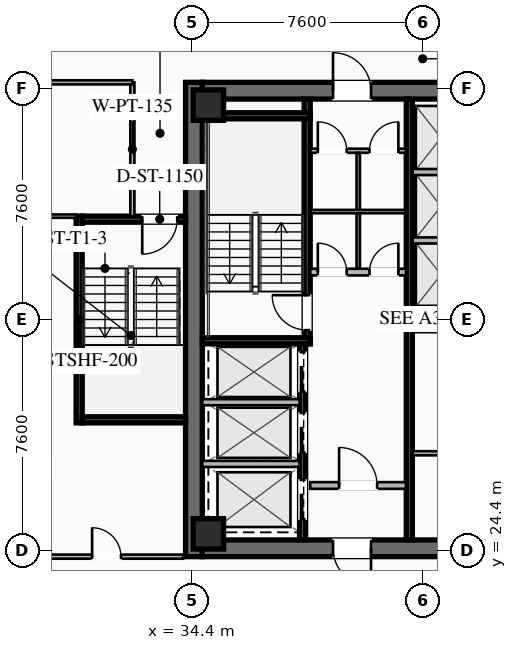
"""IFC4 building model, lengths in metres.
Left out: names, types, materials, properties, quantities, classifications, styles, units other than length and angle.
Written with IfcOpenShell. Run it as: python <this file> out.ifc"""

import sys

from ifc_helpers import new_model, si_unit, direction, frame, frame_2d, origin, origin_2d, place, context, subcontext, project, spatial, rectangle, hollow_rectangle, extrude, element, fill, save


model = new_model("IFC4")
c1 = context("Model", 3, precision=1e-05, world=origin(), true_north=direction((0.0, 1.0)))
c2 = subcontext(c1, "Body", "Model", "MODEL_VIEW")
j1 = project(units=[si_unit("LENGTHUNIT", "METRE"), si_unit("PLANEANGLEUNIT", "RADIAN")], contexts=[c1])
p1 = place(None, origin())
s1 = spatial("IfcSite", under=j1, at=p1, CompositionType="ELEMENT")
p2 = place(p1, origin())
s2 = spatial("IfcBuilding", under=s1, at=p2, CompositionType="ELEMENT")
p3 = place(p2, frame((0.0, 0.0, 188.95)))
s3 = spatial("IfcBuildingStorey", under=s2, at=p3, CompositionType="ELEMENT", Elevation=188.95)
p4 = place(p3, frame((34.475, 24.2, 0.0), z_axis=(0.0, 0.0, 1.0), x_axis=(0.0, 1.0, 0.0)))
e1 = element("IfcWall", 1, at=p4, inside=s3, PredefinedType="SHEAR", context=c2, shape_type="SweptSolid", body=[
    extrude(rectangle(XDim=15.6, YDim=0.55, at=frame_2d((7.8, 0.0))), origin(), (0.0, 0.0, 1.0), 3.55),
])
p5 = place(p3, frame((49.25, 24.475, 0.0), z_axis=(0.0, 0.0, 1.0), x_axis=(-1.0, 0.0, 0.0)))
e2 = element("IfcWall", 2, at=p5, inside=s3, PredefinedType="SHEAR", context=c2, shape_type="SweptSolid", body=[
    extrude(rectangle(XDim=14.5, YDim=0.55, at=frame_2d((7.25, 0.0))), origin(), (0.0, 0.0, 1.0), 3.55),
])
p6 = place(p5, frame((8.95, 0.0, 0.0)))
e3 = element("IfcOpeningElement", 3, at=p6, cuts=e2, PredefinedType="OPENING", context=c2, shape_type="SweptSolid", body=[
    extrude(rectangle(XDim=1.25, YDim=2.25, at=frame_2d((0.625, 1.125))), frame((0.0, 0.285, 0.0), z_axis=(0.0, -1.0, 0.0), x_axis=(1.0, 0.0, 0.0)), (0.0, 0.0, 1.0), 0.57),
])
p7 = place(p5, frame((3.9, 0.0, 0.0)))
e4 = element("IfcOpeningElement", 4, at=p7, cuts=e2, PredefinedType="OPENING", context=c2, shape_type="SweptSolid", body=[
    extrude(rectangle(XDim=1.25, YDim=2.25, at=frame_2d((0.625, 1.125))), frame((0.0, 0.285, 0.0), z_axis=(0.0, -1.0, 0.0), x_axis=(1.0, 0.0, 0.0)), (0.0, 0.0, 1.0), 0.57),
])
p8 = place(p3, frame((34.75, 39.525, 0.0), z_axis=(0.0, 0.0, 1.0), x_axis=(1.0, 0.0, 0.0)))
e5 = element("IfcWall", 5, at=p8, inside=s3, PredefinedType="SHEAR", context=c2, shape_type="SweptSolid", body=[
    extrude(rectangle(XDim=14.5, YDim=0.55, at=frame_2d((7.25, 0.0))), origin(), (0.0, 0.0, 1.0), 3.55),
])
p9 = place(p8, frame((4.3, 0.0, 0.0)))
e6 = element("IfcOpeningElement", 6, at=p9, cuts=e5, PredefinedType="OPENING", context=c2, shape_type="SweptSolid", body=[
    extrude(rectangle(XDim=1.25, YDim=2.25, at=frame_2d((0.625, 1.125))), frame((0.0, 0.285, 0.0), z_axis=(0.0, -1.0, 0.0), x_axis=(1.0, 0.0, 0.0)), (0.0, 0.0, 1.0), 0.57),
])
p10 = place(p8, frame((9.35, 0.0, 0.0)))
e7 = element("IfcOpeningElement", 7, at=p10, cuts=e5, PredefinedType="OPENING", context=c2, shape_type="SweptSolid", body=[
    extrude(rectangle(XDim=1.25, YDim=2.25, at=frame_2d((0.625, 1.125))), frame((0.0, 0.285, 0.0), z_axis=(0.0, -1.0, 0.0), x_axis=(1.0, 0.0, 0.0)), (0.0, 0.0, 1.0), 0.57),
])
for number, where, z_axis, x_axis in (
    (8, (34.95, 24.95, 0.0), (0.0, 0.0, 1.0), (1.0, 0.0, 0.0)),
    (9, (34.95, 39.05, 0.0), (0.0, 0.0, 1.0), (1.0, 0.0, 0.0)),
):
    element("IfcColumn", number, at=place(p3, frame(where, z_axis=z_axis, x_axis=x_axis)), inside=s3, PredefinedType="COLUMN", context=c2, shape_type="SweptSolid", body=[
        extrude(hollow_rectangle(XDim=1.0, YDim=1.0, WallThickness=0.04, at=origin_2d()), origin(), (0.0, 0.0, 1.0), 3.37),
    ])
p11 = place(p3, frame((38.2, 31.2, 0.0), z_axis=(0.0, 0.0, 1.0), x_axis=(0.0, 1.0, 0.0)))
e10 = element("IfcWall", 10, at=p11, inside=s3, PredefinedType="SHEAR", context=c2, shape_type="SweptSolid", body=[
    extrude(rectangle(XDim=8.05, YDim=0.2, at=frame_2d((4.025, 0.0))), origin(), (0.0, 0.0, 1.0), 3.37),
])
p12 = place(p11, frame((0.45, 0.0, 0.0)))
e11 = element("IfcOpeningElement", 11, at=p12, cuts=e10, PredefinedType="OPENING", context=c2, shape_type="SweptSolid", body=[
    extrude(rectangle(XDim=1.15, YDim=2.2, at=frame_2d((0.575, 1.1))), frame((0.0, 0.11, 0.0), z_axis=(0.0, -1.0, 0.0), x_axis=(1.0, 0.0, 0.0)), (0.0, 0.0, 1.0), 0.22),
])
for number, where, z_axis, x_axis in (
    (12, (34.75, 31.3, 0.0), (0.0, 0.0, 1.0), (1.0, 0.0, 0.0)),
    (13, (34.75, 38.7, 0.0), (0.0, 0.0, 1.0), (1.0, 0.0, 0.0)),
):
    element("IfcWall", number, at=place(p3, frame(where, z_axis=z_axis, x_axis=x_axis)), inside=s3, PredefinedType="SHEAR", context=c2, shape_type="SweptSolid", body=[
        extrude(rectangle(XDim=3.55, YDim=0.2, at=frame_2d((1.775, 0.0))), origin(), (0.0, 0.0, 1.0), 3.37),
    ])
p13 = place(p3, frame((41.56, 24.75, 0.0), z_axis=(0.0, 0.0, 1.0), x_axis=(0.0, 1.0, 0.0)))
e14 = element("IfcWall", 14, at=p13, inside=s3, PredefinedType="SHEAR", context=c2, shape_type="SweptSolid", body=[
    extrude(rectangle(XDim=14.5, YDim=0.2, at=frame_2d((7.25, 0.0))), origin(), (0.0, 0.0, 1.0), 3.37),
])
p14 = place(p3, frame((38.3, 33.56, 0.0), z_axis=(0.0, 0.0, 1.0), x_axis=(1.0, 0.0, 0.0)))
e15 = element("IfcWall", 15, at=p14, inside=s3, PredefinedType="SOLIDWALL", context=c2, shape_type="SweptSolid", body=[
    extrude(rectangle(XDim=3.15, YDim=0.22, at=frame_2d((1.575, 0.0))), origin(), (0.0, 0.0, 1.0), 2.723),
])
p15 = place(p14, frame((0.25, 0.0, 0.0)))
e16 = element("IfcOpeningElement", 16, at=p15, cuts=e15, PredefinedType="OPENING", context=c2, shape_type="SweptSolid", body=[
    extrude(rectangle(XDim=0.95, YDim=2.05, at=frame_2d((0.475, 1.025))), frame((0.0, 0.12, 0.0), z_axis=(0.0, -1.0, 0.0), x_axis=(1.0, 0.0, 0.0)), (0.0, 0.0, 1.0), 0.24),
])
p16 = place(p14, frame((1.95, 0.0, 0.0)))
e17 = element("IfcOpeningElement", 17, at=p16, cuts=e15, PredefinedType="OPENING", context=c2, shape_type="SweptSolid", body=[
    extrude(rectangle(XDim=0.95, YDim=2.05, at=frame_2d((0.475, 1.025))), frame((0.0, 0.12, 0.0), z_axis=(0.0, -1.0, 0.0), x_axis=(1.0, 0.0, 0.0)), (0.0, 0.0, 1.0), 0.24),
])
p17 = place(p3, frame((38.3, 26.54, 0.0), z_axis=(0.0, 0.0, 1.0), x_axis=(1.0, 0.0, 0.0)))
e18 = element("IfcWall", 18, at=p17, inside=s3, PredefinedType="SOLIDWALL", context=c2, shape_type="SweptSolid", body=[
    extrude(rectangle(XDim=3.15, YDim=0.22, at=frame_2d((1.575, 0.0))), origin(), (0.0, 0.0, 1.0), 2.723),
])
p18 = place(p17, frame((0.95, 0.0, 0.0)))
e19 = element("IfcOpeningElement", 19, at=p18, cuts=e18, PredefinedType="OPENING", context=c2, shape_type="SweptSolid", body=[
    extrude(rectangle(XDim=1.25, YDim=2.25, at=frame_2d((0.625, 1.125))), frame((0.0, 0.12, 0.0), z_axis=(0.0, -1.0, 0.0), x_axis=(1.0, 0.0, 0.0)), (0.0, 0.0, 1.0), 0.24),
])
p19 = place(p3, frame((38.05, 24.75, 0.0), z_axis=(0.0, 0.0, 1.0), x_axis=(0.0, 1.0, 0.0)))
e20 = element("IfcWall", 20, at=p19, inside=s3, PredefinedType="SHEAR", context=c2, shape_type="SweptSolid", body=[
    extrude(rectangle(XDim=6.45, YDim=0.2, at=frame_2d((3.225, 0.0))), origin(), (0.0, 0.0, 1.0), 3.37),
])
p20 = place(p19, frame((4.875, 0.0, 0.0)))
e21 = element("IfcOpeningElement", 21, at=p20, cuts=e20, PredefinedType="OPENING", context=c2, shape_type="SweptSolid", body=[
    extrude(rectangle(XDim=1.3, YDim=2.25, at=frame_2d((0.65, 1.125))), frame((0.0, 0.11, 0.0), z_axis=(0.0, -1.0, 0.0), x_axis=(1.0, 0.0, 0.0)), (0.0, 0.0, 1.0), 0.22),
])
p21 = place(p19, frame((2.875, 0.0, 0.0)))
e22 = element("IfcOpeningElement", 22, at=p21, cuts=e20, PredefinedType="OPENING", context=c2, shape_type="SweptSolid", body=[
    extrude(rectangle(XDim=1.3, YDim=2.25, at=frame_2d((0.65, 1.125))), frame((0.0, 0.11, 0.0), z_axis=(0.0, -1.0, 0.0), x_axis=(1.0, 0.0, 0.0)), (0.0, 0.0, 1.0), 0.22),
])
p22 = place(p19, frame((0.675, 0.0, 0.0)))
e23 = element("IfcOpeningElement", 23, at=p22, cuts=e20, PredefinedType="OPENING", context=c2, shape_type="SweptSolid", body=[
    extrude(rectangle(XDim=1.3, YDim=2.25, at=frame_2d((0.65, 1.125))), frame((0.0, 0.11, 0.0), z_axis=(0.0, -1.0, 0.0), x_axis=(1.0, 0.0, 0.0)), (0.0, 0.0, 1.0), 0.22),
])
for number, where, z_axis, x_axis in (
    (24, (34.75, 27.25, 0.0), (0.0, 0.0, 1.0), (1.0, 0.0, 0.0)),
    (25, (34.75, 29.28, 0.0), (0.0, 0.0, 1.0), (1.0, 0.0, 0.0)),
):
    element("IfcWall", number, at=place(p3, frame(where, z_axis=z_axis, x_axis=x_axis)), inside=s3, PredefinedType="SOLIDWALL", context=c2, shape_type="SweptSolid", body=[
        extrude(rectangle(XDim=3.2, YDim=0.2, at=frame_2d((1.6, 0.0))), origin(), (0.0, 0.0, 1.0), 3.37),
    ])
p23 = place(p3, frame((38.3, 37.55, 0.0), z_axis=(0.0, 0.0, 1.0), x_axis=(1.0, 0.0, 0.0)))
e26 = element("IfcWall", 26, at=p23, inside=s3, PredefinedType="PARTITIONING", context=c2, shape_type="SweptSolid", body=[
    extrude(rectangle(XDim=3.15, YDim=0.135, at=frame_2d((1.575, 0.0))), origin(), (0.0, 0.0, 1.0), 2.723),
])
p24 = place(p23, frame((0.25, 0.0, 0.0)))
e27 = element("IfcOpeningElement", 27, at=p24, cuts=e26, PredefinedType="OPENING", context=c2, shape_type="SweptSolid", body=[
    extrude(rectangle(XDim=0.95, YDim=2.05, at=frame_2d((0.475, 1.025))), frame((0.0, 0.077, 0.0), z_axis=(0.0, -1.0, 0.0), x_axis=(1.0, 0.0, 0.0)), (0.0, 0.0, 1.0), 0.155),
])
p25 = place(p23, frame((1.95, 0.0, 0.0)))
e28 = element("IfcOpeningElement", 28, at=p25, cuts=e26, PredefinedType="OPENING", context=c2, shape_type="SweptSolid", body=[
    extrude(rectangle(XDim=0.95, YDim=2.05, at=frame_2d((0.475, 1.025))), frame((0.0, 0.077, 0.0), z_axis=(0.0, -1.0, 0.0), x_axis=(1.0, 0.0, 0.0)), (0.0, 0.0, 1.0), 0.155),
])
p26 = place(p3, frame((39.88, 33.68, 0.0), z_axis=(0.0, 0.0, 1.0), x_axis=(0.0, 1.0, 0.0)))
e29 = element("IfcWall", 29, at=p26, inside=s3, PredefinedType="PARTITIONING", context=c2, shape_type="SweptSolid", body=[
    extrude(rectangle(XDim=3.8, YDim=0.11, at=frame_2d((1.9, 0.0))), origin(), (0.0, 0.0, 1.0), 2.723),
])
p27 = place(p3, frame((38.3, 35.55, 0.0), z_axis=(0.0, 0.0, 1.0), x_axis=(1.0, 0.0, 0.0)))
e30 = element("IfcWall", 30, at=p27, inside=s3, PredefinedType="PARTITIONING", context=c2, shape_type="SweptSolid", body=[
    extrude(rectangle(XDim=3.15, YDim=0.11, at=frame_2d((1.575, 0.0))), origin(), (0.0, 0.0, 1.0), 2.723),
])
for number, where, z_axis, x_axis in (
    (31, (41.67, 31.65, 0.0), (0.0, 0.0, 1.0), (1.0, 0.0, 0.0)),
    (32, (41.67, 27.6, 0.0), (0.0, 0.0, 1.0), (1.0, 0.0, 0.0)),
):
    element("IfcWall", number, at=place(p3, frame(where, z_axis=z_axis, x_axis=x_axis)), inside=s3, PredefinedType="PARTITIONING", context=c2, shape_type="SweptSolid", body=[
        extrude(rectangle(XDim=1.88, YDim=0.135, at=frame_2d((0.94, 0.0))), origin(), (0.0, 0.0, 1.0), 2.723),
    ])
for number, where, z_axis, x_axis in (
    (33, (41.67, 32.35, 0.0), (0.0, 0.0, 1.0), (1.0, 0.0, 0.0)),
    (34, (41.67, 34.6, 0.0), (0.0, 0.0, 1.0), (1.0, 0.0, 0.0)),
    (35, (41.67, 36.85, 0.0), (0.0, 0.0, 1.0), (1.0, 0.0, 0.0)),
):
    element("IfcWall", number, at=place(p3, frame(where, z_axis=z_axis, x_axis=x_axis)), inside=s3, PredefinedType="SOLIDWALL", context=c2, shape_type="SweptSolid", body=[
        extrude(rectangle(XDim=1.88, YDim=0.2, at=frame_2d((0.94, 0.0))), origin(), (0.0, 0.0, 1.0), 3.37),
    ])
p28 = place(p3, frame((30.7, 28.6, 0.0), z_axis=(0.0, 0.0, 1.0), x_axis=(0.0, 1.0, 0.0)))
e36 = element("IfcWall", 36, at=p28, inside=s3, PredefinedType="SHEAR", context=c2, shape_type="SweptSolid", body=[
    extrude(rectangle(XDim=6.8, YDim=0.2, at=frame_2d((3.4, 0.0))), origin(), (0.0, 0.0, 1.0), 3.37),
])
p29 = place(p3, frame((34.2, 35.3, 0.0), z_axis=(0.0, 0.0, 1.0), x_axis=(-1.0, 0.0, 0.0)))
e37 = element("IfcWall", 37, at=p29, inside=s3, PredefinedType="SHEAR", context=c2, shape_type="SweptSolid", body=[
    extrude(rectangle(XDim=3.4, YDim=0.2, at=frame_2d((1.7, 0.0))), origin(), (0.0, 0.0, 1.0), 3.37),
])
p30 = place(p29, frame((0.275, 0.0, 0.0)))
e38 = element("IfcOpeningElement", 38, at=p30, cuts=e37, PredefinedType="OPENING", context=c2, shape_type="SweptSolid", body=[
    extrude(rectangle(XDim=1.15, YDim=2.2, at=frame_2d((0.575, 1.1))), frame((0.0, 0.11, 0.0), z_axis=(0.0, -1.0, 0.0), x_axis=(1.0, 0.0, 0.0)), (0.0, 0.0, 1.0), 0.22),
])
p31 = place(p3, frame((30.8, 28.7, 0.0), z_axis=(0.0, 0.0, 1.0), x_axis=(1.0, 0.0, 0.0)))
e39 = element("IfcWall", 39, at=p31, inside=s3, PredefinedType="SHEAR", context=c2, shape_type="SweptSolid", body=[
    extrude(rectangle(XDim=3.4, YDim=0.2, at=frame_2d((1.7, 0.0))), origin(), (0.0, 0.0, 1.0), 3.37),
])
p32 = place(p3, frame((32.45, 35.4, 0.0), z_axis=(0.0, 0.0, 1.0), x_axis=(0.0, 1.0, 0.0)))
e40 = element("IfcWall", 40, at=p32, inside=s3, PredefinedType="PARTITIONING", context=c2, shape_type="SweptSolid", body=[
    extrude(rectangle(XDim=4.4, YDim=0.135, at=frame_2d((2.2, 0.0))), origin(), (0.0, 0.0, 1.0), 2.723),
])
p33 = place(p3, frame((32.45, 39.8, 0.0), z_axis=(0.0, 0.0, 1.0), x_axis=(-1.0, 0.0, 0.0)))
e41 = element("IfcWall", 41, at=p33, inside=s3, PredefinedType="PARTITIONING", context=c2, shape_type="SweptSolid", body=[
    extrude(rectangle(XDim=7.98, YDim=0.135, at=frame_2d((3.99, 0.0))), origin(), (0.0, 0.0, 1.0), 2.723),
])
p34 = place(p33, frame((3.24, 0.0, 0.0)))
e42 = element("IfcOpeningElement", 42, at=p34, cuts=e41, PredefinedType="OPENING", context=c2, shape_type="SweptSolid", body=[
    extrude(rectangle(XDim=0.95, YDim=2.05, at=frame_2d((0.475, 1.025))), frame((0.0, 0.077, 0.0), z_axis=(0.0, -1.0, 0.0), x_axis=(1.0, 0.0, 0.0)), (0.0, 0.0, 1.0), 0.155),
])
p35 = place(p3, frame((24.47, 24.2, 0.0), z_axis=(0.0, 0.0, 1.0), x_axis=(1.0, 0.0, 0.0)))
e43 = element("IfcWall", 43, at=p35, inside=s3, PredefinedType="PARTITIONING", context=c2, shape_type="SweptSolid", body=[
    extrude(rectangle(XDim=9.65, YDim=0.135, at=frame_2d((4.825, 0.0))), origin(), (0.0, 0.0, 1.0), 2.723),
])
p36 = place(p35, frame((6.655, 0.0, 0.0)))
e44 = element("IfcOpeningElement", 44, at=p36, cuts=e43, PredefinedType="OPENING", context=c2, shape_type="SweptSolid", body=[
    extrude(rectangle(XDim=0.95, YDim=2.05, at=frame_2d((0.475, 1.025))), frame((0.0, 0.077, 0.0), z_axis=(0.0, -1.0, 0.0), x_axis=(1.0, 0.0, 0.0)), (0.0, 0.0, 1.0), 0.155),
])
p37 = place(p3, frame((30.6, 35.4, 0.0), z_axis=(0.0, 0.0, 1.0), x_axis=(-1.0, 0.0, 0.0)))
e45 = element("IfcWall", 45, at=p37, inside=s3, PredefinedType="PARTITIONING", context=c2, shape_type="SweptSolid", body=[
    extrude(rectangle(XDim=6.13, YDim=0.11, at=frame_2d((3.065, 0.0))), origin(), (0.0, 0.0, 1.0), 2.723),
])
p38 = place(p9, origin())
e46 = element("IfcDoor", 46, at=p38, inside=s3, OperationType="SINGLE_SWING_LEFT", PredefinedType="DOOR", context=c2, shape_type="SweptSolid", body=[
    extrude(rectangle(XDim=1.25, YDim=2.25, at=frame_2d((0.625, 1.125))), frame((0.0, 0.025, 0.0), z_axis=(0.0, -1.0, 0.0), x_axis=(1.0, 0.0, 0.0)), (0.0, 0.0, 1.0), 0.05),
])
fill(e6, e46)
p39 = place(p6, origin())
e47 = element("IfcDoor", 47, at=p39, inside=s3, OperationType="SINGLE_SWING_LEFT", PredefinedType="DOOR", context=c2, shape_type="SweptSolid", body=[
    extrude(rectangle(XDim=1.25, YDim=2.25, at=frame_2d((0.625, 1.125))), frame((0.0, 0.025, 0.0), z_axis=(0.0, -1.0, 0.0), x_axis=(1.0, 0.0, 0.0)), (0.0, 0.0, 1.0), 0.05),
])
fill(e3, e47)
p40 = place(p12, origin())
e48 = element("IfcDoor", 48, at=p40, inside=s3, OperationType="SINGLE_SWING_RIGHT", PredefinedType="DOOR", context=c2, shape_type="SweptSolid", body=[
    extrude(rectangle(XDim=1.15, YDim=2.2, at=frame_2d((0.575, 1.1))), frame((0.0, 0.025, 0.0), z_axis=(0.0, -1.0, 0.0), x_axis=(1.0, 0.0, 0.0)), (0.0, 0.0, 1.0), 0.05),
])
fill(e11, e48)
p41 = place(p18, origin())
e49 = element("IfcDoor", 49, at=p41, inside=s3, OperationType="SINGLE_SWING_LEFT", PredefinedType="DOOR", context=c2, shape_type="SweptSolid", body=[
    extrude(rectangle(XDim=1.25, YDim=2.25, at=frame_2d((0.625, 1.125))), frame((0.0, 0.025, 0.0), z_axis=(0.0, -1.0, 0.0), x_axis=(1.0, 0.0, 0.0)), (0.0, 0.0, 1.0), 0.05),
])
fill(e19, e49)
p42 = place(p24, origin())
e50 = element("IfcDoor", 50, at=p42, inside=s3, OperationType="SINGLE_SWING_LEFT", PredefinedType="DOOR", context=c2, shape_type="SweptSolid", body=[
    extrude(rectangle(XDim=0.95, YDim=2.05, at=frame_2d((0.475, 1.025))), frame((0.0, 0.025, 0.0), z_axis=(0.0, -1.0, 0.0), x_axis=(1.0, 0.0, 0.0)), (0.0, 0.0, 1.0), 0.05),
])
fill(e27, e50)
p43 = place(p25, origin())
e51 = element("IfcDoor", 51, at=p43, inside=s3, OperationType="SINGLE_SWING_RIGHT", PredefinedType="DOOR", context=c2, shape_type="SweptSolid", body=[
    extrude(rectangle(XDim=0.95, YDim=2.05, at=frame_2d((0.475, 1.025))), frame((0.0, 0.025, 0.0), z_axis=(0.0, -1.0, 0.0), x_axis=(1.0, 0.0, 0.0)), (0.0, 0.0, 1.0), 0.05),
])
fill(e28, e51)
p44 = place(p15, origin())
e52 = element("IfcDoor", 52, at=p44, inside=s3, OperationType="SINGLE_SWING_LEFT", PredefinedType="DOOR", context=c2, shape_type="SweptSolid", body=[
    extrude(rectangle(XDim=0.95, YDim=2.05, at=frame_2d((0.475, 1.025))), frame((0.0, 0.025, 0.0), z_axis=(0.0, -1.0, 0.0), x_axis=(1.0, 0.0, 0.0)), (0.0, 0.0, 1.0), 0.05),
])
fill(e16, e52)
p45 = place(p16, origin())
e53 = element("IfcDoor", 53, at=p45, inside=s3, OperationType="SINGLE_SWING_RIGHT", PredefinedType="DOOR", context=c2, shape_type="SweptSolid", body=[
    extrude(rectangle(XDim=0.95, YDim=2.05, at=frame_2d((0.475, 1.025))), frame((0.0, 0.025, 0.0), z_axis=(0.0, -1.0, 0.0), x_axis=(1.0, 0.0, 0.0)), (0.0, 0.0, 1.0), 0.05),
])
fill(e17, e53)
p46 = place(p30, origin())
e54 = element("IfcDoor", 54, at=p46, inside=s3, OperationType="SINGLE_SWING_RIGHT", PredefinedType="DOOR", context=c2, shape_type="SweptSolid", body=[
    extrude(rectangle(XDim=1.15, YDim=2.2, at=frame_2d((0.575, 1.1))), frame((0.0, 0.025, 0.0), z_axis=(0.0, -1.0, 0.0), x_axis=(1.0, 0.0, 0.0)), (0.0, 0.0, 1.0), 0.05),
])
fill(e38, e54)
p47 = place(p36, origin())
e55 = element("IfcDoor", 55, at=p47, inside=s3, OperationType="SINGLE_SWING_LEFT", PredefinedType="DOOR", context=c2, shape_type="SweptSolid", body=[
    extrude(rectangle(XDim=0.95, YDim=2.05, at=frame_2d((0.475, 1.025))), frame((0.0, 0.025, 0.0), z_axis=(0.0, -1.0, 0.0), x_axis=(1.0, 0.0, 0.0)), (0.0, 0.0, 1.0), 0.05),
])
fill(e44, e55)
p48 = place(p20, origin())
e56 = element("IfcDoor", 56, at=p48, inside=s3, OperationType="SLIDING_TO_LEFT", PredefinedType="DOOR", context=c2, shape_type="SweptSolid", body=[
    extrude(rectangle(XDim=1.3, YDim=2.25, at=frame_2d((0.65, 1.125))), frame((0.0, 0.025, 0.0), z_axis=(0.0, -1.0, 0.0), x_axis=(1.0, 0.0, 0.0)), (0.0, 0.0, 1.0), 0.05),
])
fill(e21, e56)
p49 = place(p21, origin())
e57 = element("IfcDoor", 57, at=p49, inside=s3, OperationType="SLIDING_TO_LEFT", PredefinedType="DOOR", context=c2, shape_type="SweptSolid", body=[
    extrude(rectangle(XDim=1.3, YDim=2.25, at=frame_2d((0.65, 1.125))), frame((0.0, 0.025, 0.0), z_axis=(0.0, -1.0, 0.0), x_axis=(1.0, 0.0, 0.0)), (0.0, 0.0, 1.0), 0.05),
])
fill(e22, e57)
p50 = place(p22, origin())
e58 = element("IfcDoor", 58, at=p50, inside=s3, OperationType="SLIDING_TO_LEFT", PredefinedType="DOOR", context=c2, shape_type="SweptSolid", body=[
    extrude(rectangle(XDim=1.3, YDim=2.25, at=frame_2d((0.65, 1.125))), frame((0.0, 0.025, 0.0), z_axis=(0.0, -1.0, 0.0), x_axis=(1.0, 0.0, 0.0)), (0.0, 0.0, 1.0), 0.05),
])
fill(e23, e58)
save(model, sys.argv[1])
